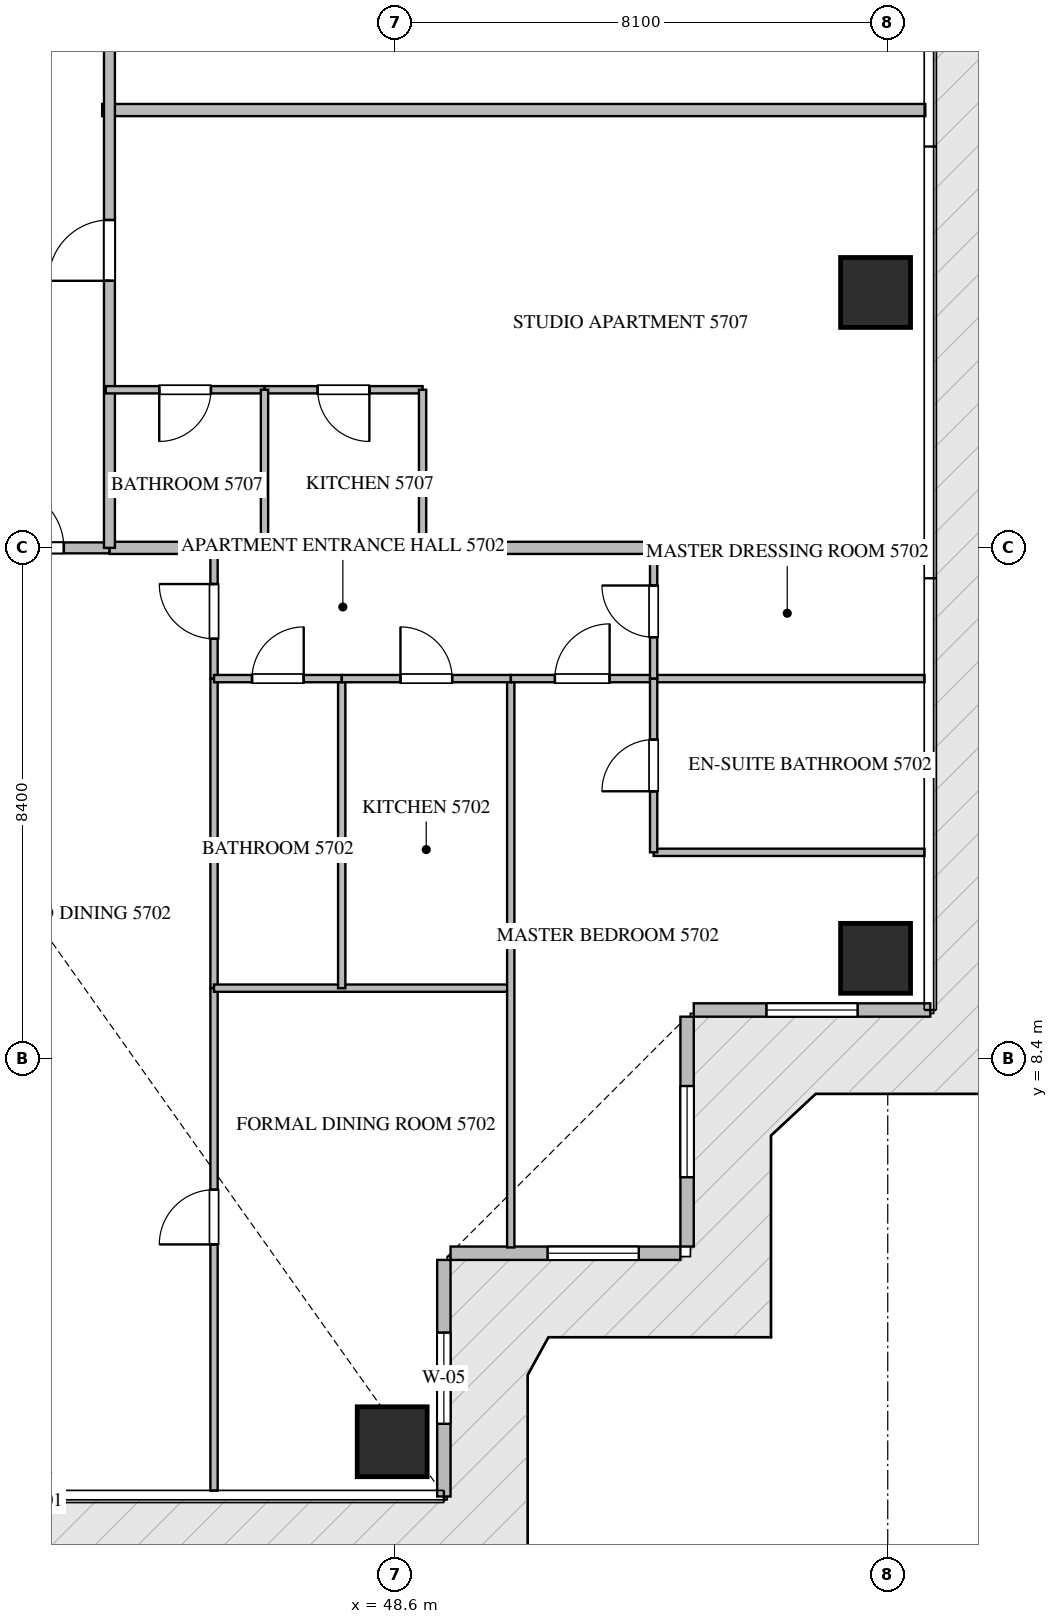
"""IFC4 building model, lengths in metres.
Left out: names, types, materials, properties, quantities, classifications, styles, units other than length and angle.
Written with IfcOpenShell. Run it as: python <this file> out.ifc"""

import sys

from ifc_helpers import new_model, si_unit, direction, frame, frame_2d, origin, origin_2d, place, context, subcontext, project, spatial, rectangle, extrude, source, transform, mapped, element, fill, save


model = new_model("IFC4")
c1 = context("Model", 3, precision=1e-05, world=origin(), true_north=direction((0.0, 1.0)))
c2 = subcontext(c1, "Body", "Model", "MODEL_VIEW")
j1 = project(units=[si_unit("LENGTHUNIT", "METRE"), si_unit("PLANEANGLEUNIT", "RADIAN")], contexts=[c1])
p1 = place(None, origin())
s1 = spatial("IfcSite", under=j1, at=p1, CompositionType="ELEMENT")
p2 = place(p1, origin())
s2 = spatial("IfcBuilding", under=s1, at=p2, CompositionType="ELEMENT")
p3 = place(p2, frame((0.0, 0.0, 229.7)))
s3 = spatial("IfcBuildingStorey", under=s2, at=p3, CompositionType="ELEMENT", Elevation=229.7)
m1 = source(origin(), c2, "Body", "SweptSolid", [
    extrude(rectangle(XDim=1.15, YDim=1.15, at=origin_2d()), origin(), (0.0, 0.0, 1.0), 3.85),
])
for number, where, z_axis, x_axis in (
    (1, (48.55, 2.1, -0.26), (0.0, 0.0, 1.0), (1.0, 0.0, 0.0)),
    (2, (56.5, 10.05, -0.26), (0.0, 0.0, 1.0), (1.0, 0.0, 0.0)),
    (3, (56.5, 21.0, -0.26), (0.0, 0.0, 1.0), (1.0, 0.0, 0.0)),
):
    element("IfcColumn", number, at=place(p3, frame(where, z_axis=z_axis, x_axis=x_axis)), inside=s3, PredefinedType="COLUMN", context=c2, shape_type="MappedRepresentation", body=[
        mapped(m1, transform((0.0, 0.0, 0.0), scale=1.0)),
    ])
p4 = place(p3, frame((49.4, 1.2, 0.0), z_axis=(0.0, 0.0, 1.0), x_axis=(0.0, 1.0, 0.0)))
e4 = element("IfcWall", 4, at=p4, inside=s3, PredefinedType="ELEMENTEDWALL", context=c2, shape_type="SweptSolid", body=[
    extrude(rectangle(XDim=3.89, YDim=0.22, at=frame_2d((1.945, 0.0))), origin(), (0.0, 0.0, 1.0), 3.575),
])
p5 = place(p4, frame((1.195, 0.0, 0.65)))
e5 = element("IfcOpeningElement", 5, at=p5, cuts=e4, PredefinedType="OPENING", context=c2, shape_type="SweptSolid", body=[
    extrude(rectangle(XDim=1.5, YDim=2.25, at=frame_2d((0.75, 1.125))), frame((0.0, 0.12, 0.0), z_axis=(0.0, -1.0, 0.0), x_axis=(1.0, 0.0, 0.0)), (0.0, 0.0, 1.0), 0.24),
])
p6 = place(p3, frame((49.51, 5.2, 0.0), z_axis=(0.0, 0.0, 1.0), x_axis=(1.0, 0.0, 0.0)))
e6 = element("IfcWall", 6, at=p6, inside=s3, PredefinedType="ELEMENTEDWALL", context=c2, shape_type="SweptSolid", body=[
    extrude(rectangle(XDim=3.78, YDim=0.22, at=frame_2d((1.89, 0.0))), origin(), (0.0, 0.0, 1.0), 3.575),
])
p7 = place(p6, frame((1.596, 0.0, 0.65)))
e7 = element("IfcOpeningElement", 7, at=p7, cuts=e6, PredefinedType="OPENING", context=c2, shape_type="SweptSolid", body=[
    extrude(rectangle(XDim=1.5, YDim=2.25, at=frame_2d((0.75, 1.125))), frame((0.0, 0.12, 0.0), z_axis=(0.0, -1.0, 0.0), x_axis=(1.0, 0.0, 0.0)), (0.0, 0.0, 1.0), 0.24),
])
p8 = place(p3, frame((53.4, 5.31, 0.0), z_axis=(0.0, 0.0, 1.0), x_axis=(0.0, 1.0, 0.0)))
e8 = element("IfcWall", 8, at=p8, inside=s3, PredefinedType="ELEMENTEDWALL", context=c2, shape_type="SweptSolid", body=[
    extrude(rectangle(XDim=3.78, YDim=0.22, at=frame_2d((1.89, 0.0))), origin(), (0.0, 0.0, 1.0), 3.575),
])
p9 = place(p8, frame((1.14, 0.0, 0.65)))
e9 = element("IfcOpeningElement", 9, at=p9, cuts=e8, PredefinedType="OPENING", context=c2, shape_type="SweptSolid", body=[
    extrude(rectangle(XDim=1.5, YDim=2.25, at=frame_2d((0.75, 1.125))), frame((0.0, 0.12, 0.0), z_axis=(0.0, -1.0, 0.0), x_axis=(1.0, 0.0, 0.0)), (0.0, 0.0, 1.0), 0.24),
])
p10 = place(p3, frame((53.51, 9.2, 0.0), z_axis=(0.0, 0.0, 1.0), x_axis=(1.0, 0.0, 0.0)))
e10 = element("IfcWall", 10, at=p10, inside=s3, PredefinedType="ELEMENTEDWALL", context=c2, shape_type="SweptSolid", body=[
    extrude(rectangle(XDim=3.89, YDim=0.22, at=frame_2d((1.945, 0.0))), origin(), (0.0, 0.0, 1.0), 3.575),
])
p11 = place(p10, frame((1.195, 0.0, 0.65)))
e11 = element("IfcOpeningElement", 11, at=p11, cuts=e10, PredefinedType="OPENING", context=c2, shape_type="SweptSolid", body=[
    extrude(rectangle(XDim=1.5, YDim=2.25, at=frame_2d((0.75, 1.125))), frame((0.0, 0.12, 0.0), z_axis=(0.0, -1.0, 0.0), x_axis=(1.0, 0.0, 0.0)), (0.0, 0.0, 1.0), 0.24),
])
p12 = place(p3, frame((43.78, 24.0, 0.0), z_axis=(0.0, 0.0, 1.0), x_axis=(1.0, 0.0, 0.0)))
e12 = element("IfcWall", 12, at=p12, inside=s3, PredefinedType="PARTITIONING", context=c2, shape_type="SweptSolid", body=[
    extrude(rectangle(XDim=13.538, YDim=0.2, at=frame_2d((6.769, 0.0))), origin(), (0.0, 0.0, 1.0), 3.59),
])
p13 = place(p3, frame((43.9, 16.8, 0.0), z_axis=(0.0, 0.0, 1.0), x_axis=(1.0, 0.0, 0.0)))
e13 = element("IfcWall", 13, at=p13, inside=s3, PredefinedType="PARTITIONING", context=c2, shape_type="SweptSolid", body=[
    extrude(rectangle(XDim=13.418, YDim=0.2, at=frame_2d((6.709, 0.0))), origin(), (0.0, 0.0, 1.0), 3.59),
])
p14 = place(p3, frame((41.402, 16.8, 0.0), z_axis=(0.0, 0.0, 1.0), x_axis=(1.0, 0.0, 0.0)))
e14 = element("IfcWall", 14, at=p14, inside=s3, PredefinedType="PARTITIONING", context=c2, shape_type="SweptSolid", body=[
    extrude(rectangle(XDim=2.496, YDim=0.18, at=frame_2d((1.248, 0.0))), origin(), (0.0, 0.0, 1.0), 3.59),
])
p15 = place(p14, frame((0.748, 0.0, 0.0)))
e15 = element("IfcOpeningElement", 15, at=p15, cuts=e14, PredefinedType="OPENING", context=c2, shape_type="SweptSolid", body=[
    extrude(rectangle(XDim=1.0, YDim=2.15, at=frame_2d((0.5, 1.075))), frame((0.0, 0.1, 0.0), z_axis=(0.0, -1.0, 0.0), x_axis=(1.0, 0.0, 0.0)), (0.0, 0.0, 1.0), 0.2),
])
p16 = place(p3, frame((43.9, 16.8, 0.0), z_axis=(0.0, 0.0, 1.0), x_axis=(0.0, 1.0, 0.0)))
e16 = element("IfcWall", 16, at=p16, inside=s3, PredefinedType="PARTITIONING", context=c2, shape_type="SweptSolid", body=[
    extrude(rectangle(XDim=16.8, YDim=0.18, at=frame_2d((8.4, 0.0))), origin(), (0.0, 0.0, 1.0), 3.59),
])
p17 = place(p16, frame((4.392, 0.0, 0.0)))
e17 = element("IfcOpeningElement", 17, at=p17, cuts=e16, PredefinedType="OPENING", context=c2, shape_type="SweptSolid", body=[
    extrude(rectangle(XDim=1.0, YDim=2.15, at=frame_2d((0.5, 1.075))), frame((0.0, 0.1, 0.0), z_axis=(0.0, -1.0, 0.0), x_axis=(1.0, 0.0, 0.0)), (0.0, 0.0, 1.0), 0.2),
])
p18 = place(p16, frame((8.595, 0.0, 0.0)))
e18 = element("IfcOpeningElement", 18, at=p18, cuts=e16, PredefinedType="OPENING", context=c2, shape_type="SweptSolid", body=[
    extrude(rectangle(XDim=1.0, YDim=2.15, at=frame_2d((0.5, 1.075))), frame((0.0, 0.1, 0.0), z_axis=(0.0, -1.0, 0.0), x_axis=(1.0, 0.0, 0.0)), (0.0, 0.0, 1.0), 0.2),
])
p19 = place(p3, frame((45.62, 14.65, 0.0), z_axis=(0.0, 0.0, 1.0), x_axis=(0.0, 1.0, 0.0)))
e19 = element("IfcWall", 19, at=p19, inside=s3, PredefinedType="PARTITIONING", context=c2, shape_type="SweptSolid", body=[
    extrude(rectangle(XDim=2.21, YDim=0.12, at=frame_2d((1.105, 0.0))), origin(), (0.0, 0.0, 1.0), 3.59),
])
p20 = place(p19, frame((0.655, 0.0, 0.0)))
e20 = element("IfcOpeningElement", 20, at=p20, cuts=e19, PredefinedType="OPENING", context=c2, shape_type="SweptSolid", body=[
    extrude(rectangle(XDim=0.9, YDim=2.1, at=frame_2d((0.45, 1.05))), frame((0.0, 0.07, 0.0), z_axis=(0.0, -1.0, 0.0), x_axis=(1.0, 0.0, 0.0)), (0.0, 0.0, 1.0), 0.14),
])
p21 = place(p3, frame((45.62, 1.295, 0.0), z_axis=(0.0, 0.0, 1.0), x_axis=(0.0, 1.0, 0.0)))
e21 = element("IfcWall", 21, at=p21, inside=s3, PredefinedType="PARTITIONING", context=c2, shape_type="SweptSolid", body=[
    extrude(rectangle(XDim=8.264, YDim=0.12, at=frame_2d((4.132, 0.0))), origin(), (0.0, 0.0, 1.0), 3.59),
])
p22 = place(p21, frame((4.05, 0.0, 0.0)))
e22 = element("IfcOpeningElement", 22, at=p22, cuts=e21, PredefinedType="OPENING", context=c2, shape_type="SweptSolid", body=[
    extrude(rectangle(XDim=0.9, YDim=2.1, at=frame_2d((0.45, 1.05))), frame((0.0, 0.07, 0.0), z_axis=(0.0, -1.0, 0.0), x_axis=(1.0, 0.0, 0.0)), (0.0, 0.0, 1.0), 0.14),
])
p23 = place(p3, frame((45.62, 9.561, 0.0), z_axis=(0.0, 0.0, 1.0), x_axis=(0.0, 1.0, 0.0)))
e23 = element("IfcWall", 23, at=p23, inside=s3, PredefinedType="PARTITIONING", context=c2, shape_type="SweptSolid", body=[
    extrude(rectangle(XDim=5.087, YDim=0.12, at=frame_2d((2.543, 0.0))), origin(), (0.0, 0.0, 1.0), 3.59),
])
p24 = place(p3, frame((45.62, 9.559, 0.0), z_axis=(0.0, 0.0, 1.0), x_axis=(1.0, 0.0, 0.0)))
e24 = element("IfcWall", 24, at=p24, inside=s3, PredefinedType="PARTITIONING", context=c2, shape_type="SweptSolid", body=[
    extrude(rectangle(XDim=4.88, YDim=0.12, at=frame_2d((2.44, 0.0))), origin(), (0.0, 0.0, 1.0), 3.59),
])
p25 = place(p3, frame((50.5, 5.295, 0.0), z_axis=(0.0, 0.0, 1.0), x_axis=(0.0, 1.0, 0.0)))
e25 = element("IfcWall", 25, at=p25, inside=s3, PredefinedType="PARTITIONING", context=c2, shape_type="SweptSolid", body=[
    extrude(rectangle(XDim=9.355, YDim=0.12, at=frame_2d((4.677, 0.0))), origin(), (0.0, 0.0, 1.0), 3.59),
])
p26 = place(p3, frame((47.72, 9.559, 0.0), z_axis=(0.0, 0.0, 1.0), x_axis=(0.0, 1.0, 0.0)))
e26 = element("IfcWall", 26, at=p26, inside=s3, PredefinedType="PARTITIONING", context=c2, shape_type="SweptSolid", body=[
    extrude(rectangle(XDim=5.091, YDim=0.12, at=frame_2d((2.545, 0.0))), origin(), (0.0, 0.0, 1.0), 3.59),
])
p27 = place(p3, frame((45.62, 14.65, 0.0), z_axis=(0.0, 0.0, 1.0), x_axis=(1.0, 0.0, 0.0)))
e27 = element("IfcWall", 27, at=p27, inside=s3, PredefinedType="PARTITIONING", context=c2, shape_type="SweptSolid", body=[
    extrude(rectangle(XDim=2.1, YDim=0.12, at=frame_2d((1.05, 0.0))), origin(), (0.0, 0.0, 1.0), 3.59),
])
p28 = place(p27, frame((0.625, 0.0, 0.0)))
e28 = element("IfcOpeningElement", 28, at=p28, cuts=e27, PredefinedType="OPENING", context=c2, shape_type="SweptSolid", body=[
    extrude(rectangle(XDim=0.85, YDim=2.1, at=frame_2d((0.425, 1.05))), frame((0.0, 0.07, 0.0), z_axis=(0.0, -1.0, 0.0), x_axis=(1.0, 0.0, 0.0)), (0.0, 0.0, 1.0), 0.14),
])
p29 = place(p3, frame((47.722, 14.65, 0.0), z_axis=(0.0, 0.0, 1.0), x_axis=(1.0, 0.0, 0.0)))
e29 = element("IfcWall", 29, at=p29, inside=s3, PredefinedType="PARTITIONING", context=c2, shape_type="SweptSolid", body=[
    extrude(rectangle(XDim=2.778, YDim=0.12, at=frame_2d((1.389, 0.0))), origin(), (0.0, 0.0, 1.0), 3.59),
])
p30 = place(p29, frame((0.964, 0.0, 0.0)))
e30 = element("IfcOpeningElement", 30, at=p30, cuts=e29, PredefinedType="OPENING", context=c2, shape_type="SweptSolid", body=[
    extrude(rectangle(XDim=0.85, YDim=2.1, at=frame_2d((0.425, 1.05))), frame((0.0, 0.07, 0.0), z_axis=(0.0, -1.0, 0.0), x_axis=(1.0, 0.0, 0.0)), (0.0, 0.0, 1.0), 0.14),
])
p31 = place(p3, frame((50.502, 14.65, 0.0), z_axis=(0.0, 0.0, 1.0), x_axis=(1.0, 0.0, 0.0)))
e31 = element("IfcWall", 31, at=p31, inside=s3, PredefinedType="PARTITIONING", context=c2, shape_type="SweptSolid", body=[
    extrude(rectangle(XDim=2.348, YDim=0.12, at=frame_2d((1.174, 0.0))), origin(), (0.0, 0.0, 1.0), 3.59),
])
p32 = place(p31, frame((0.724, 0.0, 0.0)))
e32 = element("IfcOpeningElement", 32, at=p32, cuts=e31, PredefinedType="OPENING", context=c2, shape_type="SweptSolid", body=[
    extrude(rectangle(XDim=0.9, YDim=2.1, at=frame_2d((0.45, 1.05))), frame((0.0, 0.07, 0.0), z_axis=(0.0, -1.0, 0.0), x_axis=(1.0, 0.0, 0.0)), (0.0, 0.0, 1.0), 0.14),
])
p33 = place(p3, frame((52.85, 11.793, 0.0), z_axis=(0.0, 0.0, 1.0), x_axis=(1.0, 0.0, 0.0)))
e33 = element("IfcWall", 33, at=p33, inside=s3, PredefinedType="PARTITIONING", context=c2, shape_type="SweptSolid", body=[
    extrude(rectangle(XDim=4.455, YDim=0.12, at=frame_2d((2.228, 0.0))), origin(), (0.0, 0.0, 1.0), 3.59),
])
p34 = place(p3, frame((52.852, 14.65, 0.0), z_axis=(0.0, 0.0, 1.0), x_axis=(1.0, 0.0, 0.0)))
e34 = element("IfcWall", 34, at=p34, inside=s3, PredefinedType="PARTITIONING", context=c2, shape_type="SweptSolid", body=[
    extrude(rectangle(XDim=4.453, YDim=0.12, at=frame_2d((2.227, 0.0))), origin(), (0.0, 0.0, 1.0), 3.59),
])
p35 = place(p3, frame((52.85, 11.793, 0.0), z_axis=(0.0, 0.0, 1.0), x_axis=(0.0, 1.0, 0.0)))
e35 = element("IfcWall", 35, at=p35, inside=s3, PredefinedType="PARTITIONING", context=c2, shape_type="SweptSolid", body=[
    extrude(rectangle(XDim=2.857, YDim=0.12, at=frame_2d((1.428, 0.0))), origin(), (0.0, 0.0, 1.0), 3.59),
])
p36 = place(p35, frame((1.004, 0.0, 0.0)))
e36 = element("IfcOpeningElement", 36, at=p36, cuts=e35, PredefinedType="OPENING", context=c2, shape_type="SweptSolid", body=[
    extrude(rectangle(XDim=0.85, YDim=2.1, at=frame_2d((0.425, 1.05))), frame((0.0, 0.07, 0.0), z_axis=(0.0, -1.0, 0.0), x_axis=(1.0, 0.0, 0.0)), (0.0, 0.0, 1.0), 0.14),
])
p37 = place(p3, frame((52.85, 14.652, 0.0), z_axis=(0.0, 0.0, 1.0), x_axis=(0.0, 1.0, 0.0)))
e37 = element("IfcWall", 37, at=p37, inside=s3, PredefinedType="PARTITIONING", context=c2, shape_type="SweptSolid", body=[
    extrude(rectangle(XDim=2.208, YDim=0.12, at=frame_2d((1.104, 0.0))), origin(), (0.0, 0.0, 1.0), 3.59),
])
p38 = place(p37, frame((0.679, 0.0, 0.0)))
e38 = element("IfcOpeningElement", 38, at=p38, cuts=e37, PredefinedType="OPENING", context=c2, shape_type="SweptSolid", body=[
    extrude(rectangle(XDim=0.85, YDim=2.1, at=frame_2d((0.425, 1.05))), frame((0.0, 0.07, 0.0), z_axis=(0.0, -1.0, 0.0), x_axis=(1.0, 0.0, 0.0)), (0.0, 0.0, 1.0), 0.14),
])
p39 = place(p3, frame((49.05, 19.4, 0.0), z_axis=(0.0, 0.0, 1.0), x_axis=(-1.0, 0.0, 0.0)))
e39 = element("IfcWall", 39, at=p39, inside=s3, PredefinedType="PARTITIONING", context=c2, shape_type="SweptSolid", body=[
    extrude(rectangle(XDim=2.6, YDim=0.12, at=frame_2d((1.3, 0.0))), origin(), (0.0, 0.0, 1.0), 3.59),
])
p40 = place(p39, frame((0.875, 0.0, 0.0)))
e40 = element("IfcOpeningElement", 40, at=p40, cuts=e39, PredefinedType="OPENING", context=c2, shape_type="SweptSolid", body=[
    extrude(rectangle(XDim=0.85, YDim=2.1, at=frame_2d((0.425, 1.05))), frame((0.0, 0.07, 0.0), z_axis=(0.0, -1.0, 0.0), x_axis=(1.0, 0.0, 0.0)), (0.0, 0.0, 1.0), 0.14),
])
p41 = place(p3, frame((46.448, 19.4, 0.0), z_axis=(0.0, 0.0, 1.0), x_axis=(-1.0, 0.0, 0.0)))
e41 = element("IfcWall", 41, at=p41, inside=s3, PredefinedType="PARTITIONING", context=c2, shape_type="SweptSolid", body=[
    extrude(rectangle(XDim=2.608, YDim=0.12, at=frame_2d((1.304, 0.0))), origin(), (0.0, 0.0, 1.0), 3.59),
])
p42 = place(p41, frame((0.879, 0.0, 0.0)))
e42 = element("IfcOpeningElement", 42, at=p42, cuts=e41, PredefinedType="OPENING", context=c2, shape_type="SweptSolid", body=[
    extrude(rectangle(XDim=0.85, YDim=2.1, at=frame_2d((0.425, 1.05))), frame((0.0, 0.07, 0.0), z_axis=(0.0, -1.0, 0.0), x_axis=(1.0, 0.0, 0.0)), (0.0, 0.0, 1.0), 0.14),
])
for number, where, z_axis, x_axis in (
    (43, (46.45, 16.74, 0.0), (0.0, 0.0, 1.0), (0.0, 1.0, 0.0)),
    (44, (49.05, 16.74, 0.0), (0.0, 0.0, 1.0), (0.0, 1.0, 0.0)),
):
    element("IfcWall", number, at=place(p3, frame(where, z_axis=z_axis, x_axis=x_axis)), inside=s3, PredefinedType="PARTITIONING", context=c2, shape_type="SweptSolid", body=[
        extrude(rectangle(XDim=2.66, YDim=0.12, at=frame_2d((1.33, 0.0))), origin(), (0.0, 0.0, 1.0), 3.59),
    ])
m2 = source(origin(), c2, "Body", "SweptSolid", [
    extrude(rectangle(XDim=1.5, YDim=2.25, at=frame_2d((0.75, 1.125))), frame((0.0, 0.03, 0.0), z_axis=(0.0, -1.0, 0.0), x_axis=(1.0, 0.0, 0.0)), (0.0, 0.0, 1.0), 0.06),
])
p43 = place(p5, origin())
e45 = element("IfcWindow", 45, at=p43, inside=s3, PartitioningType="SINGLE_PANEL", PredefinedType="WINDOW", context=c2, shape_type="MappedRepresentation", body=[
    mapped(m2, transform((0.0, 0.0, 0.0), scale=1.0)),
])
fill(e5, e45)
p44 = place(p7, origin())
e46 = element("IfcWindow", 46, at=p44, inside=s3, PartitioningType="SINGLE_PANEL", PredefinedType="WINDOW", context=c2, shape_type="MappedRepresentation", body=[
    mapped(m2, transform((0.0, 0.0, 0.0), scale=1.0)),
])
fill(e7, e46)
p45 = place(p9, origin())
e47 = element("IfcWindow", 47, at=p45, inside=s3, PartitioningType="SINGLE_PANEL", PredefinedType="WINDOW", context=c2, shape_type="MappedRepresentation", body=[
    mapped(m2, transform((0.0, 0.0, 0.0), scale=1.0)),
])
fill(e9, e47)
p46 = place(p11, origin())
e48 = element("IfcWindow", 48, at=p46, inside=s3, PartitioningType="SINGLE_PANEL", PredefinedType="WINDOW", context=c2, shape_type="MappedRepresentation", body=[
    mapped(m2, transform((0.0, 0.0, 0.0), scale=1.0)),
])
fill(e11, e48)
m3 = source(origin(), c2, "Body", "SweptSolid", [
    extrude(rectangle(XDim=1.0, YDim=2.15, at=frame_2d((0.5, 1.075))), frame((0.0, 0.025, 0.0), z_axis=(0.0, -1.0, 0.0), x_axis=(1.0, 0.0, 0.0)), (0.0, 0.0, 1.0), 0.05),
])
p47 = place(p15, origin())
e49 = element("IfcDoor", 49, at=p47, inside=s3, OperationType="SINGLE_SWING_LEFT", PredefinedType="DOOR", context=c2, shape_type="MappedRepresentation", body=[
    mapped(m3, transform((0.0, 0.0, 0.0), scale=1.0)),
])
fill(e15, e49)
p48 = place(p17, origin())
e50 = element("IfcDoor", 50, at=p48, inside=s3, OperationType="SINGLE_SWING_LEFT", PredefinedType="DOOR", context=c2, shape_type="MappedRepresentation", body=[
    mapped(m3, transform((0.0, 0.0, 0.0), scale=1.0)),
])
fill(e17, e50)
m4 = source(origin(), c2, "Body", "SweptSolid", [
    extrude(rectangle(XDim=0.9, YDim=2.1, at=frame_2d((0.45, 1.05))), frame((0.0, 0.025, 0.0), z_axis=(0.0, -1.0, 0.0), x_axis=(1.0, 0.0, 0.0)), (0.0, 0.0, 1.0), 0.05),
])
p49 = place(p20, origin())
e51 = element("IfcDoor", 51, at=p49, inside=s3, OperationType="SINGLE_SWING_RIGHT", PredefinedType="DOOR", context=c2, shape_type="MappedRepresentation", body=[
    mapped(m4, transform((0.0, 0.0, 0.0), scale=1.0)),
])
fill(e20, e51)
p50 = place(p22, origin())
e52 = element("IfcDoor", 52, at=p50, inside=s3, OperationType="SINGLE_SWING_LEFT", PredefinedType="DOOR", context=c2, shape_type="MappedRepresentation", body=[
    mapped(m4, transform((0.0, 0.0, 0.0), scale=1.0)),
])
fill(e22, e52)
m5 = source(origin(), c2, "Body", "SweptSolid", [
    extrude(rectangle(XDim=0.85, YDim=2.1, at=frame_2d((0.425, 1.05))), frame((0.0, 0.025, 0.0), z_axis=(0.0, -1.0, 0.0), x_axis=(1.0, 0.0, 0.0)), (0.0, 0.0, 1.0), 0.05),
])
p51 = place(p28, origin())
e53 = element("IfcDoor", 53, at=p51, inside=s3, OperationType="SINGLE_SWING_RIGHT", PredefinedType="DOOR", context=c2, shape_type="MappedRepresentation", body=[
    mapped(m5, transform((0.0, 0.0, 0.0), scale=1.0)),
])
fill(e28, e53)
p52 = place(p30, origin())
e54 = element("IfcDoor", 54, at=p52, inside=s3, OperationType="SINGLE_SWING_LEFT", PredefinedType="DOOR", context=c2, shape_type="MappedRepresentation", body=[
    mapped(m5, transform((0.0, 0.0, 0.0), scale=1.0)),
])
fill(e30, e54)
p53 = place(p32, origin())
e55 = element("IfcDoor", 55, at=p53, inside=s3, OperationType="SINGLE_SWING_RIGHT", PredefinedType="DOOR", context=c2, shape_type="MappedRepresentation", body=[
    mapped(m4, transform((0.0, 0.0, 0.0), scale=1.0)),
])
fill(e32, e55)
p54 = place(p36, origin())
e56 = element("IfcDoor", 56, at=p54, inside=s3, OperationType="SINGLE_SWING_LEFT", PredefinedType="DOOR", context=c2, shape_type="MappedRepresentation", body=[
    mapped(m5, transform((0.0, 0.0, 0.0), scale=1.0)),
])
fill(e36, e56)
p55 = place(p38, origin())
e57 = element("IfcDoor", 57, at=p55, inside=s3, OperationType="SINGLE_SWING_RIGHT", PredefinedType="DOOR", context=c2, shape_type="MappedRepresentation", body=[
    mapped(m5, transform((0.0, 0.0, 0.0), scale=1.0)),
])
fill(e38, e57)
p56 = place(p40, origin())
e58 = element("IfcDoor", 58, at=p56, inside=s3, OperationType="SINGLE_SWING_LEFT", PredefinedType="DOOR", context=c2, shape_type="MappedRepresentation", body=[
    mapped(m5, transform((0.0, 0.0, 0.0), scale=1.0)),
])
fill(e40, e58)
p57 = place(p42, origin())
e59 = element("IfcDoor", 59, at=p57, inside=s3, OperationType="SINGLE_SWING_RIGHT", PredefinedType="DOOR", context=c2, shape_type="MappedRepresentation", body=[
    mapped(m5, transform((0.0, 0.0, 0.0), scale=1.0)),
])
fill(e42, e59)
save(model, sys.argv[1])
